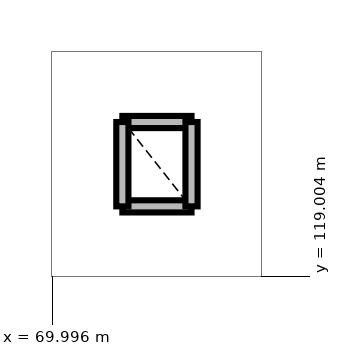
"""IFC4 building model, lengths in metres.
Left out: names, types, materials, properties, quantities, classifications, styles, units other than length and angle.
Written with IfcOpenShell. Run it as: python <this file> out.ifc"""

import sys

from ifc_helpers import new_model, si_unit, direction, frame, frame_2d, origin, place, context, subcontext, project, spatial, rectangle, extrude, element, save


model = new_model("IFC4")
c1 = context("Model", 3, precision=1e-05, world=origin(), true_north=direction((0.0, 1.0)))
c2 = subcontext(c1, "Body", "Model", "MODEL_VIEW")
j1 = project(units=[si_unit("LENGTHUNIT", "METRE"), si_unit("PLANEANGLEUNIT", "RADIAN")], contexts=[c1])
p1 = place(None, origin())
s1 = spatial("IfcSite", under=j1, at=p1, CompositionType="ELEMENT")
p2 = place(p1, origin())
s2 = spatial("IfcBuilding", under=s1, at=p2, CompositionType="ELEMENT")
p3 = place(p2, frame((0.0, 0.0, 21.9)))
s3 = spatial("IfcBuildingStorey", under=s2, at=p3, CompositionType="ELEMENT", Elevation=21.9)
for number, where, z_axis, x_axis in (
    (1, (70.92, 119.92, 0.0), (0.0, 0.0, 1.0), (1.0, 0.0, 0.0)),
    (2, (71.83, 121.03, 0.0), (0.0, 0.0, 1.0), (-1.0, 0.0, 0.0)),
):
    element("IfcWall", number, at=place(p3, frame(where, z_axis=z_axis, x_axis=x_axis)), inside=s3, PredefinedType="PARTITIONING", context=c2, shape_type="SweptSolid", body=[
        extrude(rectangle(XDim=0.91, YDim=0.16, at=frame_2d((0.455, 0.0))), origin(), (0.0, 0.0, 1.0), 3.65),
    ])
for number, where, z_axis, x_axis in (
    (3, (70.92, 121.03, 0.0), (0.0, 0.0, 1.0), (0.0, -1.0, 0.0)),
    (4, (71.83, 119.92, 0.0), (0.0, 0.0, 1.0), (0.0, 1.0, 0.0)),
):
    element("IfcWall", number, at=place(p3, frame(where, z_axis=z_axis, x_axis=x_axis)), inside=s3, PredefinedType="PARTITIONING", context=c2, shape_type="SweptSolid", body=[
        extrude(rectangle(XDim=1.11, YDim=0.16, at=frame_2d((0.555, 0.0))), origin(), (0.0, 0.0, 1.0), 3.65),
    ])
save(model, sys.argv[1])
